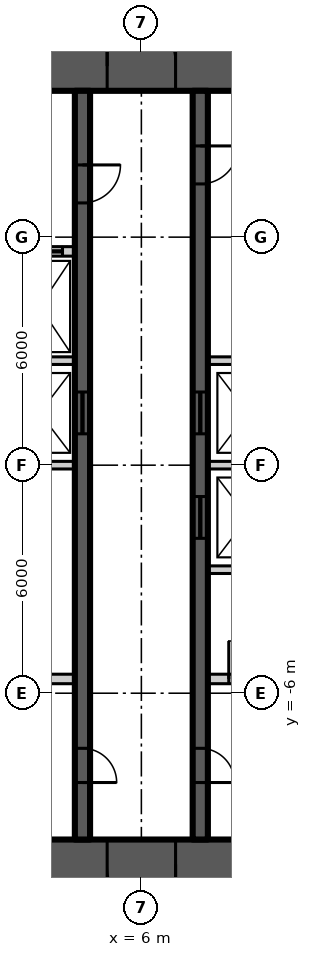
"""IFC4 building model, lengths in metres.
Left out: names, types, materials, properties, quantities, classifications, styles, units other than length and angle.
Written with IfcOpenShell. Run it as: python <this file> out.ifc"""

import sys

from ifc_helpers import new_model, si_unit, direction, frame, frame_2d, origin, place, context, subcontext, project, spatial, rectangle, extrude, element, fill, save


model = new_model("IFC4")
c1 = context("Model", 3, precision=1e-05, world=origin(), true_north=direction((0.0, 1.0)))
c2 = subcontext(c1, "Body", "Model", "MODEL_VIEW")
j1 = project(units=[si_unit("LENGTHUNIT", "METRE"), si_unit("PLANEANGLEUNIT", "RADIAN")], contexts=[c1])
p1 = place(None, origin())
s1 = spatial("IfcSite", under=j1, at=p1, CompositionType="ELEMENT")
p2 = place(p1, origin())
s2 = spatial("IfcBuilding", under=s1, at=p2, CompositionType="ELEMENT")
p3 = place(p2, frame((0.0, 0.0, 275.1)))
s3 = spatial("IfcBuildingStorey", under=s2, at=p3, CompositionType="ELEMENT", Elevation=275.1)
p4 = place(p3, frame((-11.15, 10.5, 0.0), z_axis=(0.0, 0.0, 1.0), x_axis=(1.0, 0.0, 0.0)))
e1 = element("IfcWall", 1, at=p4, inside=s3, PredefinedType="SHEAR", context=c2, shape_type="SweptSolid", body=[
    extrude(rectangle(XDim=22.3, YDim=1.3, at=frame_2d((11.15, 0.0))), origin(), (0.0, 0.0, 1.0), 3.9),
])
p5 = place(p4, frame((4.25, 0.0, 0.0)))
e2 = element("IfcOpeningElement", 2, at=p5, cuts=e1, PredefinedType="OPENING", context=c2, shape_type="SweptSolid", body=[
    extrude(rectangle(XDim=1.8, YDim=2.2, at=frame_2d((0.9, 1.1))), frame((0.0, 0.66, 0.0), z_axis=(0.0, -1.0, 0.0), x_axis=(1.0, 0.0, 0.0)), (0.0, 0.0, 1.0), 1.32),
])
p6 = place(p4, frame((16.25, 0.0, 0.0)))
e3 = element("IfcOpeningElement", 3, at=p6, cuts=e1, PredefinedType="OPENING", context=c2, shape_type="SweptSolid", body=[
    extrude(rectangle(XDim=1.8, YDim=2.2, at=frame_2d((0.9, 1.1))), frame((0.0, 0.66, 0.0), z_axis=(0.0, -1.0, 0.0), x_axis=(1.0, 0.0, 0.0)), (0.0, 0.0, 1.0), 1.32),
])
p7 = place(p3, frame((11.15, -10.5, 0.0), z_axis=(0.0, 0.0, 1.0), x_axis=(-1.0, 0.0, 0.0)))
e4 = element("IfcWall", 4, at=p7, inside=s3, PredefinedType="SHEAR", context=c2, shape_type="SweptSolid", body=[
    extrude(rectangle(XDim=22.3, YDim=1.3, at=frame_2d((11.15, 0.0))), origin(), (0.0, 0.0, 1.0), 3.9),
])
p8 = place(p7, frame((16.25, 0.0, 0.0)))
e5 = element("IfcOpeningElement", 5, at=p8, cuts=e4, PredefinedType="OPENING", context=c2, shape_type="SweptSolid", body=[
    extrude(rectangle(XDim=1.8, YDim=2.2, at=frame_2d((0.9, 1.1))), frame((0.0, 0.66, 0.0), z_axis=(0.0, -1.0, 0.0), x_axis=(1.0, 0.0, 0.0)), (0.0, 0.0, 1.0), 1.32),
])
p9 = place(p7, frame((4.25, 0.0, 0.0)))
e6 = element("IfcOpeningElement", 6, at=p9, cuts=e4, PredefinedType="OPENING", context=c2, shape_type="SweptSolid", body=[
    extrude(rectangle(XDim=1.8, YDim=2.2, at=frame_2d((0.9, 1.1))), frame((0.0, 0.66, 0.0), z_axis=(0.0, -1.0, 0.0), x_axis=(1.0, 0.0, 0.0)), (0.0, 0.0, 1.0), 1.32),
])
p10 = place(p3, frame((7.55, 9.85, 0.0), z_axis=(0.0, 0.0, 1.0), x_axis=(0.0, -1.0, 0.0)))
e7 = element("IfcWall", 7, at=p10, inside=s3, PredefinedType="SHEAR", context=c2, shape_type="SweptSolid", body=[
    extrude(rectangle(XDim=19.7, YDim=0.4, at=frame_2d((9.85, 0.0))), origin(), (0.0, 0.0, 1.0), 3.9),
])
p11 = place(p10, frame((1.45, 0.0, 0.0)))
e8 = element("IfcOpeningElement", 8, at=p11, cuts=e7, PredefinedType="OPENING", context=c2, shape_type="SweptSolid", body=[
    extrude(rectangle(XDim=1.0, YDim=2.2, at=frame_2d((0.5, 1.1))), frame((0.0, 0.21, 0.0), z_axis=(0.0, -1.0, 0.0), x_axis=(1.0, 0.0, 0.0)), (0.0, 0.0, 1.0), 0.42),
])
p12 = place(p10, frame((17.3, 0.0, 0.0)))
e9 = element("IfcOpeningElement", 9, at=p12, cuts=e7, PredefinedType="OPENING", context=c2, shape_type="SweptSolid", body=[
    extrude(rectangle(XDim=0.9, YDim=2.1, at=frame_2d((0.45, 1.05))), frame((0.0, 0.21, 0.0), z_axis=(0.0, -1.0, 0.0), x_axis=(1.0, 0.0, 0.0)), (0.0, 0.0, 1.0), 0.42),
])
p13 = place(p10, frame((7.925, 0.0, 0.0)))
e10 = element("IfcOpeningElement", 10, at=p13, cuts=e7, PredefinedType="OPENING", context=c2, shape_type="SweptSolid", body=[
    extrude(rectangle(XDim=1.1, YDim=2.2, at=frame_2d((0.55, 1.1))), frame((0.0, 0.21, 0.0), z_axis=(0.0, -1.0, 0.0), x_axis=(1.0, 0.0, 0.0)), (0.0, 0.0, 1.0), 0.42),
])
p14 = place(p10, frame((10.675, 0.0, 0.0)))
e11 = element("IfcOpeningElement", 11, at=p14, cuts=e7, PredefinedType="OPENING", context=c2, shape_type="SweptSolid", body=[
    extrude(rectangle(XDim=1.1, YDim=2.2, at=frame_2d((0.55, 1.1))), frame((0.0, 0.21, 0.0), z_axis=(0.0, -1.0, 0.0), x_axis=(1.0, 0.0, 0.0)), (0.0, 0.0, 1.0), 0.42),
])
p15 = place(p3, frame((4.45, 9.85, 0.0), z_axis=(0.0, 0.0, 1.0), x_axis=(0.0, -1.0, 0.0)))
e12 = element("IfcWall", 12, at=p15, inside=s3, PredefinedType="SHEAR", context=c2, shape_type="SweptSolid", body=[
    extrude(rectangle(XDim=19.7, YDim=0.4, at=frame_2d((9.85, 0.0))), origin(), (0.0, 0.0, 1.0), 3.9),
])
p16 = place(p15, frame((1.95, 0.0, 0.0)))
e13 = element("IfcOpeningElement", 13, at=p16, cuts=e12, PredefinedType="OPENING", context=c2, shape_type="SweptSolid", body=[
    extrude(rectangle(XDim=1.0, YDim=2.2, at=frame_2d((0.5, 1.1))), frame((0.0, 0.21, 0.0), z_axis=(0.0, -1.0, 0.0), x_axis=(1.0, 0.0, 0.0)), (0.0, 0.0, 1.0), 0.42),
])
p17 = place(p15, frame((17.3, 0.0, 0.0)))
e14 = element("IfcOpeningElement", 14, at=p17, cuts=e12, PredefinedType="OPENING", context=c2, shape_type="SweptSolid", body=[
    extrude(rectangle(XDim=0.9, YDim=2.1, at=frame_2d((0.45, 1.05))), frame((0.0, 0.21, 0.0), z_axis=(0.0, -1.0, 0.0), x_axis=(1.0, 0.0, 0.0)), (0.0, 0.0, 1.0), 0.42),
])
p18 = place(p15, frame((7.925, 0.0, 0.0)))
e15 = element("IfcOpeningElement", 15, at=p18, cuts=e12, PredefinedType="OPENING", context=c2, shape_type="SweptSolid", body=[
    extrude(rectangle(XDim=1.1, YDim=2.2, at=frame_2d((0.55, 1.1))), frame((0.0, 0.21, 0.0), z_axis=(0.0, -1.0, 0.0), x_axis=(1.0, 0.0, 0.0)), (0.0, 0.0, 1.0), 0.42),
])
p19 = place(p3, frame((2.4, 5.625, 0.0), z_axis=(0.0, 0.0, 1.0), x_axis=(1.0, 0.0, 0.0)))
e16 = element("IfcWall", 16, at=p19, inside=s3, PredefinedType="SOLIDWALL", context=c2, shape_type="SweptSolid", body=[
    extrude(rectangle(XDim=1.85, YDim=0.25, at=frame_2d((0.925, 0.0))), origin(), (0.0, 0.0, 1.0), 3.7),
])
p20 = place(p19, frame((0.325, 0.0, 0.0)))
e17 = element("IfcOpeningElement", 17, at=p20, cuts=e16, PredefinedType="OPENING", context=c2, shape_type="SweptSolid", body=[
    extrude(rectangle(XDim=1.2, YDim=2.2, at=frame_2d((0.6, 1.1))), frame((0.0, 0.135, 0.0), z_axis=(0.0, -1.0, 0.0), x_axis=(1.0, 0.0, 0.0)), (0.0, 0.0, 1.0), 0.27),
])
p21 = place(p3, frame((2.4, -5.625, 0.0), z_axis=(0.0, 0.0, 1.0), x_axis=(1.0, 0.0, 0.0)))
e18 = element("IfcWall", 18, at=p21, inside=s3, PredefinedType="SOLIDWALL", context=c2, shape_type="SweptSolid", body=[
    extrude(rectangle(XDim=1.85, YDim=0.25, at=frame_2d((0.925, 0.0))), origin(), (0.0, 0.0, 1.0), 3.7),
])
p22 = place(p3, frame((7.75, -5.625, 0.0), z_axis=(0.0, 0.0, 1.0), x_axis=(1.0, 0.0, 0.0)))
e19 = element("IfcWall", 19, at=p22, inside=s3, PredefinedType="SOLIDWALL", context=c2, shape_type="SweptSolid", body=[
    extrude(rectangle(XDim=2.1, YDim=0.25, at=frame_2d((1.05, 0.0))), origin(), (0.0, 0.0, 1.0), 3.7),
])
p23 = place(p22, frame((0.55, 0.0, 0.0)))
e20 = element("IfcOpeningElement", 20, at=p23, cuts=e19, PredefinedType="OPENING", context=c2, shape_type="SweptSolid", body=[
    extrude(rectangle(XDim=1.0, YDim=2.2, at=frame_2d((0.5, 1.1))), frame((0.0, 0.135, 0.0), z_axis=(0.0, -1.0, 0.0), x_axis=(1.0, 0.0, 0.0)), (0.0, 0.0, 1.0), 0.27),
])
p24 = place(p3, frame((7.75, -2.75, 0.0), z_axis=(0.0, 0.0, 1.0), x_axis=(1.0, 0.0, 0.0)))
e21 = element("IfcWall", 21, at=p24, inside=s3, PredefinedType="SOLIDWALL", context=c2, shape_type="SweptSolid", body=[
    extrude(rectangle(XDim=2.1, YDim=0.2, at=frame_2d((1.05, 0.0))), origin(), (0.0, 0.0, 1.0), 3.7),
])
p25 = place(p3, frame((2.4, 0.0, 0.0), z_axis=(0.0, 0.0, 1.0), x_axis=(1.0, 0.0, 0.0)))
e22 = element("IfcWall", 22, at=p25, inside=s3, PredefinedType="SOLIDWALL", context=c2, shape_type="SweptSolid", body=[
    extrude(rectangle(XDim=1.85, YDim=0.2, at=frame_2d((0.925, 0.0))), origin(), (0.0, 0.0, 1.0), 3.7),
])
p26 = place(p3, frame((7.75, 0.0, 0.0), z_axis=(0.0, 0.0, 1.0), x_axis=(1.0, 0.0, 0.0)))
e23 = element("IfcWall", 23, at=p26, inside=s3, PredefinedType="SOLIDWALL", context=c2, shape_type="SweptSolid", body=[
    extrude(rectangle(XDim=2.1, YDim=0.2, at=frame_2d((1.05, 0.0))), origin(), (0.0, 0.0, 1.0), 3.7),
])
p27 = place(p3, frame((2.4, 2.75, 0.0), z_axis=(0.0, 0.0, 1.0), x_axis=(1.0, 0.0, 0.0)))
e24 = element("IfcWall", 24, at=p27, inside=s3, PredefinedType="SOLIDWALL", context=c2, shape_type="SweptSolid", body=[
    extrude(rectangle(XDim=1.85, YDim=0.2, at=frame_2d((0.925, 0.0))), origin(), (0.0, 0.0, 1.0), 3.7),
])
p28 = place(p3, frame((7.75, 2.75, 0.0), z_axis=(0.0, 0.0, 1.0), x_axis=(1.0, 0.0, 0.0)))
e25 = element("IfcWall", 25, at=p28, inside=s3, PredefinedType="SOLIDWALL", context=c2, shape_type="SweptSolid", body=[
    extrude(rectangle(XDim=2.1, YDim=0.2, at=frame_2d((1.05, 0.0))), origin(), (0.0, 0.0, 1.0), 3.7),
])
p29 = place(p6, origin())
e26 = element("IfcDoor", 26, at=p29, inside=s3, OperationType="DOUBLE_DOOR_DOUBLE_SWING", PredefinedType="DOOR", context=c2, shape_type="SweptSolid", body=[
    extrude(rectangle(XDim=1.8, YDim=2.2, at=frame_2d((0.9, 1.1))), frame((0.0, 0.025, 0.0), z_axis=(0.0, -1.0, 0.0), x_axis=(1.0, 0.0, 0.0)), (0.0, 0.0, 1.0), 0.05),
])
fill(e3, e26)
p30 = place(p9, origin())
e27 = element("IfcDoor", 27, at=p30, inside=s3, OperationType="DOUBLE_DOOR_DOUBLE_SWING", PredefinedType="DOOR", context=c2, shape_type="SweptSolid", body=[
    extrude(rectangle(XDim=1.8, YDim=2.2, at=frame_2d((0.9, 1.1))), frame((0.0, 0.025, 0.0), z_axis=(0.0, -1.0, 0.0), x_axis=(1.0, 0.0, 0.0)), (0.0, 0.0, 1.0), 0.05),
])
fill(e6, e27)
p31 = place(p11, origin())
e28 = element("IfcDoor", 28, at=p31, inside=s3, OperationType="SINGLE_SWING_LEFT", PredefinedType="DOOR", context=c2, shape_type="SweptSolid", body=[
    extrude(rectangle(XDim=1.0, YDim=2.2, at=frame_2d((0.5, 1.1))), frame((0.0, 0.025, 0.0), z_axis=(0.0, -1.0, 0.0), x_axis=(1.0, 0.0, 0.0)), (0.0, 0.0, 1.0), 0.05),
])
fill(e8, e28)
p32 = place(p16, origin())
e29 = element("IfcDoor", 29, at=p32, inside=s3, OperationType="SINGLE_SWING_LEFT", PredefinedType="DOOR", context=c2, shape_type="SweptSolid", body=[
    extrude(rectangle(XDim=1.0, YDim=2.2, at=frame_2d((0.5, 1.1))), frame((0.0, 0.025, 0.0), z_axis=(0.0, -1.0, 0.0), x_axis=(1.0, 0.0, 0.0)), (0.0, 0.0, 1.0), 0.05),
])
fill(e13, e29)
p33 = place(p12, origin())
e30 = element("IfcDoor", 30, at=p33, inside=s3, OperationType="SINGLE_SWING_RIGHT", PredefinedType="DOOR", context=c2, shape_type="SweptSolid", body=[
    extrude(rectangle(XDim=0.9, YDim=2.1, at=frame_2d((0.45, 1.05))), frame((0.0, 0.025, 0.0), z_axis=(0.0, -1.0, 0.0), x_axis=(1.0, 0.0, 0.0)), (0.0, 0.0, 1.0), 0.05),
])
fill(e9, e30)
p34 = place(p17, origin())
e31 = element("IfcDoor", 31, at=p34, inside=s3, OperationType="SINGLE_SWING_RIGHT", PredefinedType="DOOR", context=c2, shape_type="SweptSolid", body=[
    extrude(rectangle(XDim=0.9, YDim=2.1, at=frame_2d((0.45, 1.05))), frame((0.0, 0.025, 0.0), z_axis=(0.0, -1.0, 0.0), x_axis=(1.0, 0.0, 0.0)), (0.0, 0.0, 1.0), 0.05),
])
fill(e14, e31)
p35 = place(p13, origin())
e32 = element("IfcDoor", 32, at=p35, inside=s3, OperationType="SLIDING_TO_LEFT", PredefinedType="DOOR", context=c2, shape_type="SweptSolid", body=[
    extrude(rectangle(XDim=1.1, YDim=2.2, at=frame_2d((0.55, 1.1))), frame((0.0, 0.025, 0.0), z_axis=(0.0, -1.0, 0.0), x_axis=(1.0, 0.0, 0.0)), (0.0, 0.0, 1.0), 0.05),
])
fill(e10, e32)
p36 = place(p14, origin())
e33 = element("IfcDoor", 33, at=p36, inside=s3, OperationType="SLIDING_TO_LEFT", PredefinedType="DOOR", context=c2, shape_type="SweptSolid", body=[
    extrude(rectangle(XDim=1.1, YDim=2.2, at=frame_2d((0.55, 1.1))), frame((0.0, 0.025, 0.0), z_axis=(0.0, -1.0, 0.0), x_axis=(1.0, 0.0, 0.0)), (0.0, 0.0, 1.0), 0.05),
])
fill(e11, e33)
p37 = place(p18, origin())
e34 = element("IfcDoor", 34, at=p37, inside=s3, OperationType="SLIDING_TO_LEFT", PredefinedType="DOOR", context=c2, shape_type="SweptSolid", body=[
    extrude(rectangle(XDim=1.1, YDim=2.2, at=frame_2d((0.55, 1.1))), frame((0.0, 0.025, 0.0), z_axis=(0.0, -1.0, 0.0), x_axis=(1.0, 0.0, 0.0)), (0.0, 0.0, 1.0), 0.05),
])
fill(e15, e34)
p38 = place(p20, origin())
e35 = element("IfcDoor", 35, at=p38, inside=s3, OperationType="SLIDING_TO_LEFT", PredefinedType="DOOR", context=c2, shape_type="SweptSolid", body=[
    extrude(rectangle(XDim=1.2, YDim=2.2, at=frame_2d((0.6, 1.1))), frame((0.0, 0.025, 0.0), z_axis=(0.0, -1.0, 0.0), x_axis=(1.0, 0.0, 0.0)), (0.0, 0.0, 1.0), 0.05),
])
fill(e17, e35)
p39 = place(p23, origin())
e36 = element("IfcDoor", 36, at=p39, inside=s3, OperationType="SINGLE_SWING_LEFT", PredefinedType="DOOR", context=c2, shape_type="SweptSolid", body=[
    extrude(rectangle(XDim=1.0, YDim=2.2, at=frame_2d((0.5, 1.1))), frame((0.0, 0.025, 0.0), z_axis=(0.0, -1.0, 0.0), x_axis=(1.0, 0.0, 0.0)), (0.0, 0.0, 1.0), 0.05),
])
fill(e20, e36)
save(model, sys.argv[1])
